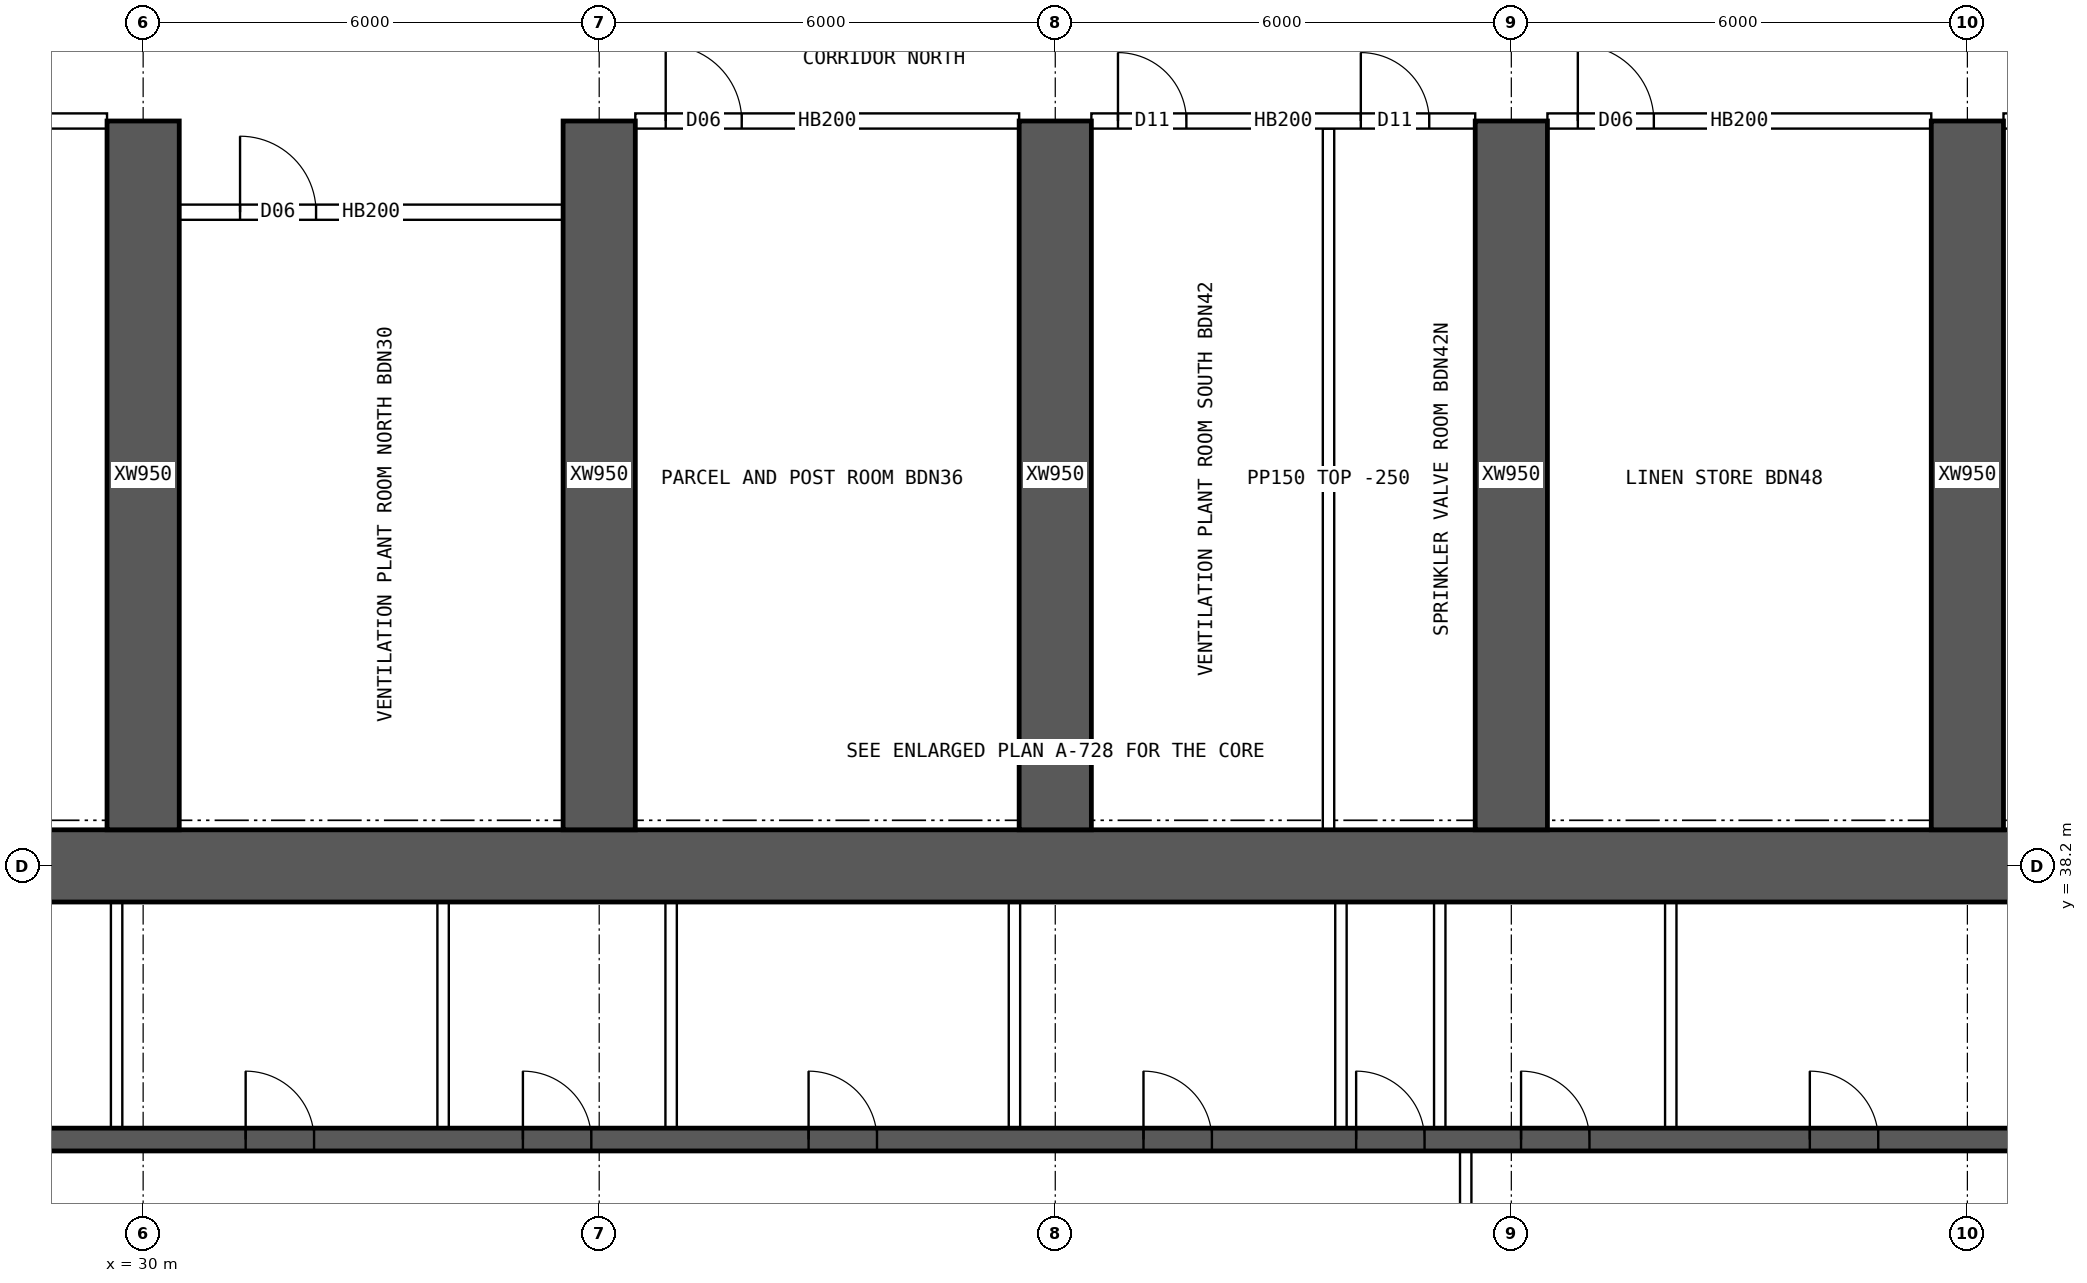
"""IFC4 building model, lengths in metres.
Left out: names, types, materials, properties, quantities, classifications, styles, units other than length and angle.
Written with IfcOpenShell. Run it as: python <this file> out.ifc"""

import sys

from ifc_helpers import new_model, si_unit, direction, frame, frame_2d, origin, place, context, subcontext, project, spatial, rectangle, extrude, element, fill, save


model = new_model("IFC4")
c1 = context("Model", 3, precision=1e-05, world=origin(), true_north=direction((0.0, 1.0)))
c2 = subcontext(c1, "Body", "Model", "MODEL_VIEW")
j1 = project(units=[si_unit("LENGTHUNIT", "METRE"), si_unit("PLANEANGLEUNIT", "RADIAN")], contexts=[c1])
p1 = place(None, origin())
s1 = spatial("IfcSite", under=j1, at=p1, CompositionType="ELEMENT")
p2 = place(p1, origin())
s2 = spatial("IfcBuilding", under=s1, at=p2, CompositionType="ELEMENT")
p3 = place(p2, frame((0.0, 0.0, 103.15)))
s3 = spatial("IfcBuildingStorey", under=s2, at=p3, CompositionType="ELEMENT", Elevation=103.15)
p4 = place(p3, frame((18.0, 38.2, 0.0), z_axis=(0.0, 0.0, 1.0), x_axis=(1.0, 0.0, 0.0)))
e1 = element("IfcWall", 1, at=p4, inside=s3, PredefinedType="SHEAR", context=c2, shape_type="SweptSolid", body=[
    extrude(rectangle(XDim=48.0, YDim=0.95, at=frame_2d((24.0, 0.0))), origin(), (0.0, 0.0, 1.0), 3.75),
])
p5 = place(p3, frame((18.475, 34.6, 0.0), z_axis=(0.0, 0.0, 1.0), x_axis=(1.0, 0.0, 0.0)))
e2 = element("IfcWall", 2, at=p5, inside=s3, PredefinedType="SHEAR", context=c2, shape_type="SweptSolid", body=[
    extrude(rectangle(XDim=47.05, YDim=0.3, at=frame_2d((23.525, 0.0))), origin(), (0.0, 0.0, 1.0), 3.75),
])
p6 = place(p5, frame((0.9, 0.0, 0.0)))
e3 = element("IfcOpeningElement", 3, at=p6, cuts=e2, PredefinedType="OPENING", context=c2, shape_type="SweptSolid", body=[
    extrude(rectangle(XDim=1.1, YDim=2.1, at=frame_2d((0.55, 1.05))), frame((0.0, 0.16, 0.0), z_axis=(0.0, -1.0, 0.0), x_axis=(1.0, 0.0, 0.0)), (0.0, 0.0, 1.0), 0.32),
])
p7 = place(p5, frame((45.05, 0.0, 0.0)))
e4 = element("IfcOpeningElement", 4, at=p7, cuts=e2, PredefinedType="OPENING", context=c2, shape_type="SweptSolid", body=[
    extrude(rectangle(XDim=1.1, YDim=2.1, at=frame_2d((0.55, 1.05))), frame((0.0, 0.16, 0.0), z_axis=(0.0, -1.0, 0.0), x_axis=(1.0, 0.0, 0.0)), (0.0, 0.0, 1.0), 0.32),
])
p8 = place(p5, frame((4.125, 0.0, 0.0)))
e5 = element("IfcOpeningElement", 5, at=p8, cuts=e2, PredefinedType="OPENING", context=c2, shape_type="SweptSolid", body=[
    extrude(rectangle(XDim=0.9, YDim=2.1, at=frame_2d((0.45, 1.05))), frame((0.0, 0.16, 0.0), z_axis=(0.0, -1.0, 0.0), x_axis=(1.0, 0.0, 0.0)), (0.0, 0.0, 1.0), 0.32),
])
p9 = place(p5, frame((42.025, 0.0, 0.0)))
e6 = element("IfcOpeningElement", 6, at=p9, cuts=e2, PredefinedType="OPENING", context=c2, shape_type="SweptSolid", body=[
    extrude(rectangle(XDim=0.9, YDim=2.1, at=frame_2d((0.45, 1.05))), frame((0.0, 0.16, 0.0), z_axis=(0.0, -1.0, 0.0), x_axis=(1.0, 0.0, 0.0)), (0.0, 0.0, 1.0), 0.32),
])
p10 = place(p5, frame((8.9, 0.0, 0.0)))
e7 = element("IfcOpeningElement", 7, at=p10, cuts=e2, PredefinedType="OPENING", context=c2, shape_type="SweptSolid", body=[
    extrude(rectangle(XDim=0.9, YDim=2.1, at=frame_2d((0.45, 1.05))), frame((0.0, 0.16, 0.0), z_axis=(0.0, -1.0, 0.0), x_axis=(1.0, 0.0, 0.0)), (0.0, 0.0, 1.0), 0.32),
])
p11 = place(p5, frame((12.874, 0.0, 0.0)))
e8 = element("IfcOpeningElement", 8, at=p11, cuts=e2, PredefinedType="OPENING", context=c2, shape_type="SweptSolid", body=[
    extrude(rectangle(XDim=0.9, YDim=2.1, at=frame_2d((0.45, 1.05))), frame((0.0, 0.16, 0.0), z_axis=(0.0, -1.0, 0.0), x_axis=(1.0, 0.0, 0.0)), (0.0, 0.0, 1.0), 0.32),
])
p12 = place(p5, frame((16.521, 0.0, 0.0)))
e9 = element("IfcOpeningElement", 9, at=p12, cuts=e2, PredefinedType="OPENING", context=c2, shape_type="SweptSolid", body=[
    extrude(rectangle(XDim=0.9, YDim=2.1, at=frame_2d((0.45, 1.05))), frame((0.0, 0.16, 0.0), z_axis=(0.0, -1.0, 0.0), x_axis=(1.0, 0.0, 0.0)), (0.0, 0.0, 1.0), 0.32),
])
p13 = place(p5, frame((20.28, 0.0, 0.0)))
e10 = element("IfcOpeningElement", 10, at=p13, cuts=e2, PredefinedType="OPENING", context=c2, shape_type="SweptSolid", body=[
    extrude(rectangle(XDim=0.9, YDim=2.1, at=frame_2d((0.45, 1.05))), frame((0.0, 0.16, 0.0), z_axis=(0.0, -1.0, 0.0), x_axis=(1.0, 0.0, 0.0)), (0.0, 0.0, 1.0), 0.32),
])
p14 = place(p5, frame((24.686, 0.0, 0.0)))
e11 = element("IfcOpeningElement", 11, at=p14, cuts=e2, PredefinedType="OPENING", context=c2, shape_type="SweptSolid", body=[
    extrude(rectangle(XDim=0.9, YDim=2.1, at=frame_2d((0.45, 1.05))), frame((0.0, 0.16, 0.0), z_axis=(0.0, -1.0, 0.0), x_axis=(1.0, 0.0, 0.0)), (0.0, 0.0, 1.0), 0.32),
])
p15 = place(p5, frame((27.483, 0.0, 0.0)))
e12 = element("IfcOpeningElement", 12, at=p15, cuts=e2, PredefinedType="OPENING", context=c2, shape_type="SweptSolid", body=[
    extrude(rectangle(XDim=0.9, YDim=2.1, at=frame_2d((0.45, 1.05))), frame((0.0, 0.16, 0.0), z_axis=(0.0, -1.0, 0.0), x_axis=(1.0, 0.0, 0.0)), (0.0, 0.0, 1.0), 0.32),
])
p16 = place(p5, frame((29.653, 0.0, 0.0)))
e13 = element("IfcOpeningElement", 13, at=p16, cuts=e2, PredefinedType="OPENING", context=c2, shape_type="SweptSolid", body=[
    extrude(rectangle(XDim=0.9, YDim=2.1, at=frame_2d((0.45, 1.05))), frame((0.0, 0.16, 0.0), z_axis=(0.0, -1.0, 0.0), x_axis=(1.0, 0.0, 0.0)), (0.0, 0.0, 1.0), 0.32),
])
p17 = place(p5, frame((33.452, 0.0, 0.0)))
e14 = element("IfcOpeningElement", 14, at=p17, cuts=e2, PredefinedType="OPENING", context=c2, shape_type="SweptSolid", body=[
    extrude(rectangle(XDim=0.9, YDim=2.1, at=frame_2d((0.45, 1.05))), frame((0.0, 0.16, 0.0), z_axis=(0.0, -1.0, 0.0), x_axis=(1.0, 0.0, 0.0)), (0.0, 0.0, 1.0), 0.32),
])
p18 = place(p5, frame((37.403, 0.0, 0.0)))
e15 = element("IfcOpeningElement", 15, at=p18, cuts=e2, PredefinedType="OPENING", context=c2, shape_type="SweptSolid", body=[
    extrude(rectangle(XDim=0.9, YDim=2.1, at=frame_2d((0.45, 1.05))), frame((0.0, 0.16, 0.0), z_axis=(0.0, -1.0, 0.0), x_axis=(1.0, 0.0, 0.0)), (0.0, 0.0, 1.0), 0.32),
])
for number, where, z_axis, x_axis in (
    (16, (30.0, 38.675, 0.0), (0.0, 0.0, 1.0), (0.0, 1.0, 0.0)),
    (17, (36.0, 38.675, 0.0), (0.0, 0.0, 1.0), (0.0, 1.0, 0.0)),
    (18, (42.0, 38.675, 0.0), (0.0, 0.0, 1.0), (0.0, 1.0, 0.0)),
    (19, (48.0, 38.675, 0.0), (0.0, 0.0, 1.0), (0.0, 1.0, 0.0)),
    (20, (54.0, 38.675, 0.0), (0.0, 0.0, 1.0), (0.0, 1.0, 0.0)),
):
    element("IfcWall", number, at=place(p3, frame(where, z_axis=z_axis, x_axis=x_axis)), inside=s3, PredefinedType="SHEAR", context=c2, shape_type="SweptSolid", body=[
        extrude(rectangle(XDim=9.325, YDim=0.95, at=frame_2d((4.663, 0.0))), origin(), (0.0, 0.0, 1.0), 3.75),
    ])
p19 = place(p3, frame((47.4, 30.55, 0.0), z_axis=(0.0, 0.0, 1.0), x_axis=(0.0, 1.0, 0.0)))
e21 = element("IfcWall", 21, at=p19, inside=s3, PredefinedType="SOLIDWALL", context=c2, shape_type="SweptSolid", body=[
    extrude(rectangle(XDim=3.9, YDim=0.15, at=frame_2d((1.95, 0.0))), origin(), (0.0, 0.0, 1.0), 3.5),
])
p20 = place(p19, frame((1.15, 0.0, 0.0)))
e22 = element("IfcOpeningElement", 22, at=p20, cuts=e21, PredefinedType="OPENING", context=c2, shape_type="SweptSolid", body=[
    extrude(rectangle(XDim=1.6, YDim=2.1, at=frame_2d((0.8, 1.05))), frame((0.0, 0.085, 0.0), z_axis=(0.0, -1.0, 0.0), x_axis=(1.0, 0.0, 0.0)), (0.0, 0.0, 1.0), 0.17),
])
for number, where, z_axis, x_axis in (
    (23, (29.651, 34.75, 0.0), (0.0, 0.0, 1.0), (0.0, 1.0, 0.0)),
    (24, (33.946, 34.75, 0.0), (0.0, 0.0, 1.0), (0.0, 1.0, 0.0)),
    (25, (36.946, 34.75, 0.0), (0.0, 0.0, 1.0), (0.0, 1.0, 0.0)),
    (26, (41.463, 34.75, 0.0), (0.0, 0.0, 1.0), (0.0, 1.0, 0.0)),
    (27, (45.758, 34.75, 0.0), (0.0, 0.0, 1.0), (0.0, 1.0, 0.0)),
    (28, (47.058, 34.75, 0.0), (0.0, 0.0, 1.0), (0.0, 1.0, 0.0)),
    (29, (50.098, 34.75, 0.0), (0.0, 0.0, 1.0), (0.0, 1.0, 0.0)),
):
    element("IfcWall", number, at=place(p3, frame(where, z_axis=z_axis, x_axis=x_axis)), inside=s3, PredefinedType="SOLIDWALL", context=c2, shape_type="SweptSolid", body=[
        extrude(rectangle(XDim=2.975, YDim=0.15, at=frame_2d((1.488, 0.0))), origin(), (0.0, 0.0, 1.0), 3.5),
    ])
p21 = place(p3, frame((24.475, 48.0, 0.0), z_axis=(0.0, 0.0, 1.0), x_axis=(1.0, 0.0, 0.0)))
e30 = element("IfcWall", 30, at=p21, inside=s3, PredefinedType="SOLIDWALL", context=c2, shape_type="SweptSolid", body=[
    extrude(rectangle(XDim=5.05, YDim=0.2, at=frame_2d((2.525, 0.0))), origin(), (0.0, 0.0, 1.0), 3.5),
])
p22 = place(p21, frame((0.15, 0.0, 0.0)))
e31 = element("IfcOpeningElement", 31, at=p22, cuts=e30, PredefinedType="OPENING", context=c2, shape_type="SweptSolid", body=[
    extrude(rectangle(XDim=0.9, YDim=2.1, at=frame_2d((0.45, 1.05))), frame((0.0, 0.11, 0.0), z_axis=(0.0, -1.0, 0.0), x_axis=(1.0, 0.0, 0.0)), (0.0, 0.0, 1.0), 0.22),
])
p23 = place(p21, frame((2.095, 0.0, 0.0)))
e32 = element("IfcOpeningElement", 32, at=p23, cuts=e30, PredefinedType="OPENING", context=c2, shape_type="SweptSolid", body=[
    extrude(rectangle(XDim=0.9, YDim=2.1, at=frame_2d((0.45, 1.05))), frame((0.0, 0.11, 0.0), z_axis=(0.0, -1.0, 0.0), x_axis=(1.0, 0.0, 0.0)), (0.0, 0.0, 1.0), 0.22),
])
p24 = place(p3, frame((36.475, 48.0, 0.0), z_axis=(0.0, 0.0, 1.0), x_axis=(1.0, 0.0, 0.0)))
e33 = element("IfcWall", 33, at=p24, inside=s3, PredefinedType="SOLIDWALL", context=c2, shape_type="SweptSolid", body=[
    extrude(rectangle(XDim=5.05, YDim=0.2, at=frame_2d((2.525, 0.0))), origin(), (0.0, 0.0, 1.0), 3.5),
])
p25 = place(p24, frame((0.4, 0.0, 0.0)))
e34 = element("IfcOpeningElement", 34, at=p25, cuts=e33, PredefinedType="OPENING", context=c2, shape_type="SweptSolid", body=[
    extrude(rectangle(XDim=1.0, YDim=2.1, at=frame_2d((0.5, 1.05))), frame((0.0, 0.11, 0.0), z_axis=(0.0, -1.0, 0.0), x_axis=(1.0, 0.0, 0.0)), (0.0, 0.0, 1.0), 0.22),
])
p26 = place(p3, frame((42.475, 48.0, 0.0), z_axis=(0.0, 0.0, 1.0), x_axis=(1.0, 0.0, 0.0)))
e35 = element("IfcWall", 35, at=p26, inside=s3, PredefinedType="SOLIDWALL", context=c2, shape_type="SweptSolid", body=[
    extrude(rectangle(XDim=5.05, YDim=0.2, at=frame_2d((2.525, 0.0))), origin(), (0.0, 0.0, 1.0), 3.5),
])
p27 = place(p26, frame((0.35, 0.0, 0.0)))
e36 = element("IfcOpeningElement", 36, at=p27, cuts=e35, PredefinedType="OPENING", context=c2, shape_type="SweptSolid", body=[
    extrude(rectangle(XDim=0.9, YDim=2.1, at=frame_2d((0.45, 1.05))), frame((0.0, 0.11, 0.0), z_axis=(0.0, -1.0, 0.0), x_axis=(1.0, 0.0, 0.0)), (0.0, 0.0, 1.0), 0.22),
])
p28 = place(p26, frame((3.545, 0.0, 0.0)))
e37 = element("IfcOpeningElement", 37, at=p28, cuts=e35, PredefinedType="OPENING", context=c2, shape_type="SweptSolid", body=[
    extrude(rectangle(XDim=0.9, YDim=2.1, at=frame_2d((0.45, 1.05))), frame((0.0, 0.11, 0.0), z_axis=(0.0, -1.0, 0.0), x_axis=(1.0, 0.0, 0.0)), (0.0, 0.0, 1.0), 0.22),
])
p29 = place(p3, frame((48.475, 48.0, 0.0), z_axis=(0.0, 0.0, 1.0), x_axis=(1.0, 0.0, 0.0)))
e38 = element("IfcWall", 38, at=p29, inside=s3, PredefinedType="SOLIDWALL", context=c2, shape_type="SweptSolid", body=[
    extrude(rectangle(XDim=5.05, YDim=0.2, at=frame_2d((2.525, 0.0))), origin(), (0.0, 0.0, 1.0), 3.5),
])
p30 = place(p29, frame((0.4, 0.0, 0.0)))
e39 = element("IfcOpeningElement", 39, at=p30, cuts=e38, PredefinedType="OPENING", context=c2, shape_type="SweptSolid", body=[
    extrude(rectangle(XDim=1.0, YDim=2.1, at=frame_2d((0.5, 1.05))), frame((0.0, 0.11, 0.0), z_axis=(0.0, -1.0, 0.0), x_axis=(1.0, 0.0, 0.0)), (0.0, 0.0, 1.0), 0.22),
])
p31 = place(p3, frame((54.475, 48.0, 0.0), z_axis=(0.0, 0.0, 1.0), x_axis=(1.0, 0.0, 0.0)))
e40 = element("IfcWall", 40, at=p31, inside=s3, PredefinedType="SOLIDWALL", context=c2, shape_type="SweptSolid", body=[
    extrude(rectangle(XDim=5.05, YDim=0.2, at=frame_2d((2.525, 0.0))), origin(), (0.0, 0.0, 1.0), 3.5),
])
p32 = place(p31, frame((0.35, 0.0, 0.0)))
e41 = element("IfcOpeningElement", 41, at=p32, cuts=e40, PredefinedType="OPENING", context=c2, shape_type="SweptSolid", body=[
    extrude(rectangle(XDim=0.9, YDim=2.1, at=frame_2d((0.45, 1.05))), frame((0.0, 0.11, 0.0), z_axis=(0.0, -1.0, 0.0), x_axis=(1.0, 0.0, 0.0)), (0.0, 0.0, 1.0), 0.22),
])
p33 = place(p31, frame((3.855, 0.0, 0.0)))
e42 = element("IfcOpeningElement", 42, at=p33, cuts=e40, PredefinedType="OPENING", context=c2, shape_type="SweptSolid", body=[
    extrude(rectangle(XDim=0.9, YDim=2.1, at=frame_2d((0.45, 1.05))), frame((0.0, 0.11, 0.0), z_axis=(0.0, -1.0, 0.0), x_axis=(1.0, 0.0, 0.0)), (0.0, 0.0, 1.0), 0.22),
])
p34 = place(p3, frame((30.475, 46.8, 0.0), z_axis=(0.0, 0.0, 1.0), x_axis=(1.0, 0.0, 0.0)))
e43 = element("IfcWall", 43, at=p34, inside=s3, PredefinedType="SOLIDWALL", context=c2, shape_type="SweptSolid", body=[
    extrude(rectangle(XDim=5.05, YDim=0.2, at=frame_2d((2.525, 0.0))), origin(), (0.0, 0.0, 1.0), 3.5),
])
p35 = place(p34, frame((0.8, 0.0, 0.0)))
e44 = element("IfcOpeningElement", 44, at=p35, cuts=e43, PredefinedType="OPENING", context=c2, shape_type="SweptSolid", body=[
    extrude(rectangle(XDim=1.0, YDim=2.1, at=frame_2d((0.5, 1.05))), frame((0.0, 0.11, 0.0), z_axis=(0.0, -1.0, 0.0), x_axis=(1.0, 0.0, 0.0)), (0.0, 0.0, 1.0), 0.22),
])
p36 = place(p3, frame((45.595, 38.675, 0.0), z_axis=(0.0, 0.0, 1.0), x_axis=(0.0, 1.0, 0.0)))
e45 = element("IfcWall", 45, at=p36, inside=s3, PredefinedType="PARTITIONING", context=c2, shape_type="SweptSolid", body=[
    extrude(rectangle(XDim=9.225, YDim=0.15, at=frame_2d((4.612, 0.0))), origin(), (0.0, 0.0, 1.0), 3.5),
])
p37 = place(p11, origin())
e46 = element("IfcDoor", 46, at=p37, inside=s3, OperationType="SINGLE_SWING_LEFT", PredefinedType="DOOR", context=c2, shape_type="SweptSolid", body=[
    extrude(rectangle(XDim=0.9, YDim=2.1, at=frame_2d((0.45, 1.05))), frame((0.0, 0.025, 0.0), z_axis=(0.0, -1.0, 0.0), x_axis=(1.0, 0.0, 0.0)), (0.0, 0.0, 1.0), 0.05),
])
fill(e8, e46)
p38 = place(p12, origin())
e47 = element("IfcDoor", 47, at=p38, inside=s3, OperationType="SINGLE_SWING_LEFT", PredefinedType="DOOR", context=c2, shape_type="SweptSolid", body=[
    extrude(rectangle(XDim=0.9, YDim=2.1, at=frame_2d((0.45, 1.05))), frame((0.0, 0.025, 0.0), z_axis=(0.0, -1.0, 0.0), x_axis=(1.0, 0.0, 0.0)), (0.0, 0.0, 1.0), 0.05),
])
fill(e9, e47)
p39 = place(p13, origin())
e48 = element("IfcDoor", 48, at=p39, inside=s3, OperationType="SINGLE_SWING_LEFT", PredefinedType="DOOR", context=c2, shape_type="SweptSolid", body=[
    extrude(rectangle(XDim=0.9, YDim=2.1, at=frame_2d((0.45, 1.05))), frame((0.0, 0.025, 0.0), z_axis=(0.0, -1.0, 0.0), x_axis=(1.0, 0.0, 0.0)), (0.0, 0.0, 1.0), 0.05),
])
fill(e10, e48)
p40 = place(p14, origin())
e49 = element("IfcDoor", 49, at=p40, inside=s3, OperationType="SINGLE_SWING_LEFT", PredefinedType="DOOR", context=c2, shape_type="SweptSolid", body=[
    extrude(rectangle(XDim=0.9, YDim=2.1, at=frame_2d((0.45, 1.05))), frame((0.0, 0.025, 0.0), z_axis=(0.0, -1.0, 0.0), x_axis=(1.0, 0.0, 0.0)), (0.0, 0.0, 1.0), 0.05),
])
fill(e11, e49)
p41 = place(p15, origin())
e50 = element("IfcDoor", 50, at=p41, inside=s3, OperationType="SINGLE_SWING_LEFT", PredefinedType="DOOR", context=c2, shape_type="SweptSolid", body=[
    extrude(rectangle(XDim=0.9, YDim=2.1, at=frame_2d((0.45, 1.05))), frame((0.0, 0.025, 0.0), z_axis=(0.0, -1.0, 0.0), x_axis=(1.0, 0.0, 0.0)), (0.0, 0.0, 1.0), 0.05),
])
fill(e12, e50)
p42 = place(p16, origin())
e51 = element("IfcDoor", 51, at=p42, inside=s3, OperationType="SINGLE_SWING_LEFT", PredefinedType="DOOR", context=c2, shape_type="SweptSolid", body=[
    extrude(rectangle(XDim=0.9, YDim=2.1, at=frame_2d((0.45, 1.05))), frame((0.0, 0.025, 0.0), z_axis=(0.0, -1.0, 0.0), x_axis=(1.0, 0.0, 0.0)), (0.0, 0.0, 1.0), 0.05),
])
fill(e13, e51)
p43 = place(p17, origin())
e52 = element("IfcDoor", 52, at=p43, inside=s3, OperationType="SINGLE_SWING_LEFT", PredefinedType="DOOR", context=c2, shape_type="SweptSolid", body=[
    extrude(rectangle(XDim=0.9, YDim=2.1, at=frame_2d((0.45, 1.05))), frame((0.0, 0.025, 0.0), z_axis=(0.0, -1.0, 0.0), x_axis=(1.0, 0.0, 0.0)), (0.0, 0.0, 1.0), 0.05),
])
fill(e14, e52)
p44 = place(p35, origin())
e53 = element("IfcDoor", 53, at=p44, inside=s3, OperationType="SINGLE_SWING_LEFT", PredefinedType="DOOR", context=c2, shape_type="SweptSolid", body=[
    extrude(rectangle(XDim=1.0, YDim=2.1, at=frame_2d((0.5, 1.05))), frame((0.0, 0.025, 0.0), z_axis=(0.0, -1.0, 0.0), x_axis=(1.0, 0.0, 0.0)), (0.0, 0.0, 1.0), 0.05),
])
fill(e44, e53)
p45 = place(p25, origin())
e54 = element("IfcDoor", 54, at=p45, inside=s3, OperationType="SINGLE_SWING_LEFT", PredefinedType="DOOR", context=c2, shape_type="SweptSolid", body=[
    extrude(rectangle(XDim=1.0, YDim=2.1, at=frame_2d((0.5, 1.05))), frame((0.0, 0.025, 0.0), z_axis=(0.0, -1.0, 0.0), x_axis=(1.0, 0.0, 0.0)), (0.0, 0.0, 1.0), 0.05),
])
fill(e34, e54)
p46 = place(p27, origin())
e55 = element("IfcDoor", 55, at=p46, inside=s3, OperationType="SINGLE_SWING_LEFT", PredefinedType="DOOR", context=c2, shape_type="SweptSolid", body=[
    extrude(rectangle(XDim=0.9, YDim=2.1, at=frame_2d((0.45, 1.05))), frame((0.0, 0.025, 0.0), z_axis=(0.0, -1.0, 0.0), x_axis=(1.0, 0.0, 0.0)), (0.0, 0.0, 1.0), 0.05),
])
fill(e36, e55)
p47 = place(p28, origin())
e56 = element("IfcDoor", 56, at=p47, inside=s3, OperationType="SINGLE_SWING_LEFT", PredefinedType="DOOR", context=c2, shape_type="SweptSolid", body=[
    extrude(rectangle(XDim=0.9, YDim=2.1, at=frame_2d((0.45, 1.05))), frame((0.0, 0.025, 0.0), z_axis=(0.0, -1.0, 0.0), x_axis=(1.0, 0.0, 0.0)), (0.0, 0.0, 1.0), 0.05),
])
fill(e37, e56)
p48 = place(p30, origin())
e57 = element("IfcDoor", 57, at=p48, inside=s3, OperationType="SINGLE_SWING_LEFT", PredefinedType="DOOR", context=c2, shape_type="SweptSolid", body=[
    extrude(rectangle(XDim=1.0, YDim=2.1, at=frame_2d((0.5, 1.05))), frame((0.0, 0.025, 0.0), z_axis=(0.0, -1.0, 0.0), x_axis=(1.0, 0.0, 0.0)), (0.0, 0.0, 1.0), 0.05),
])
fill(e39, e57)
save(model, sys.argv[1])
